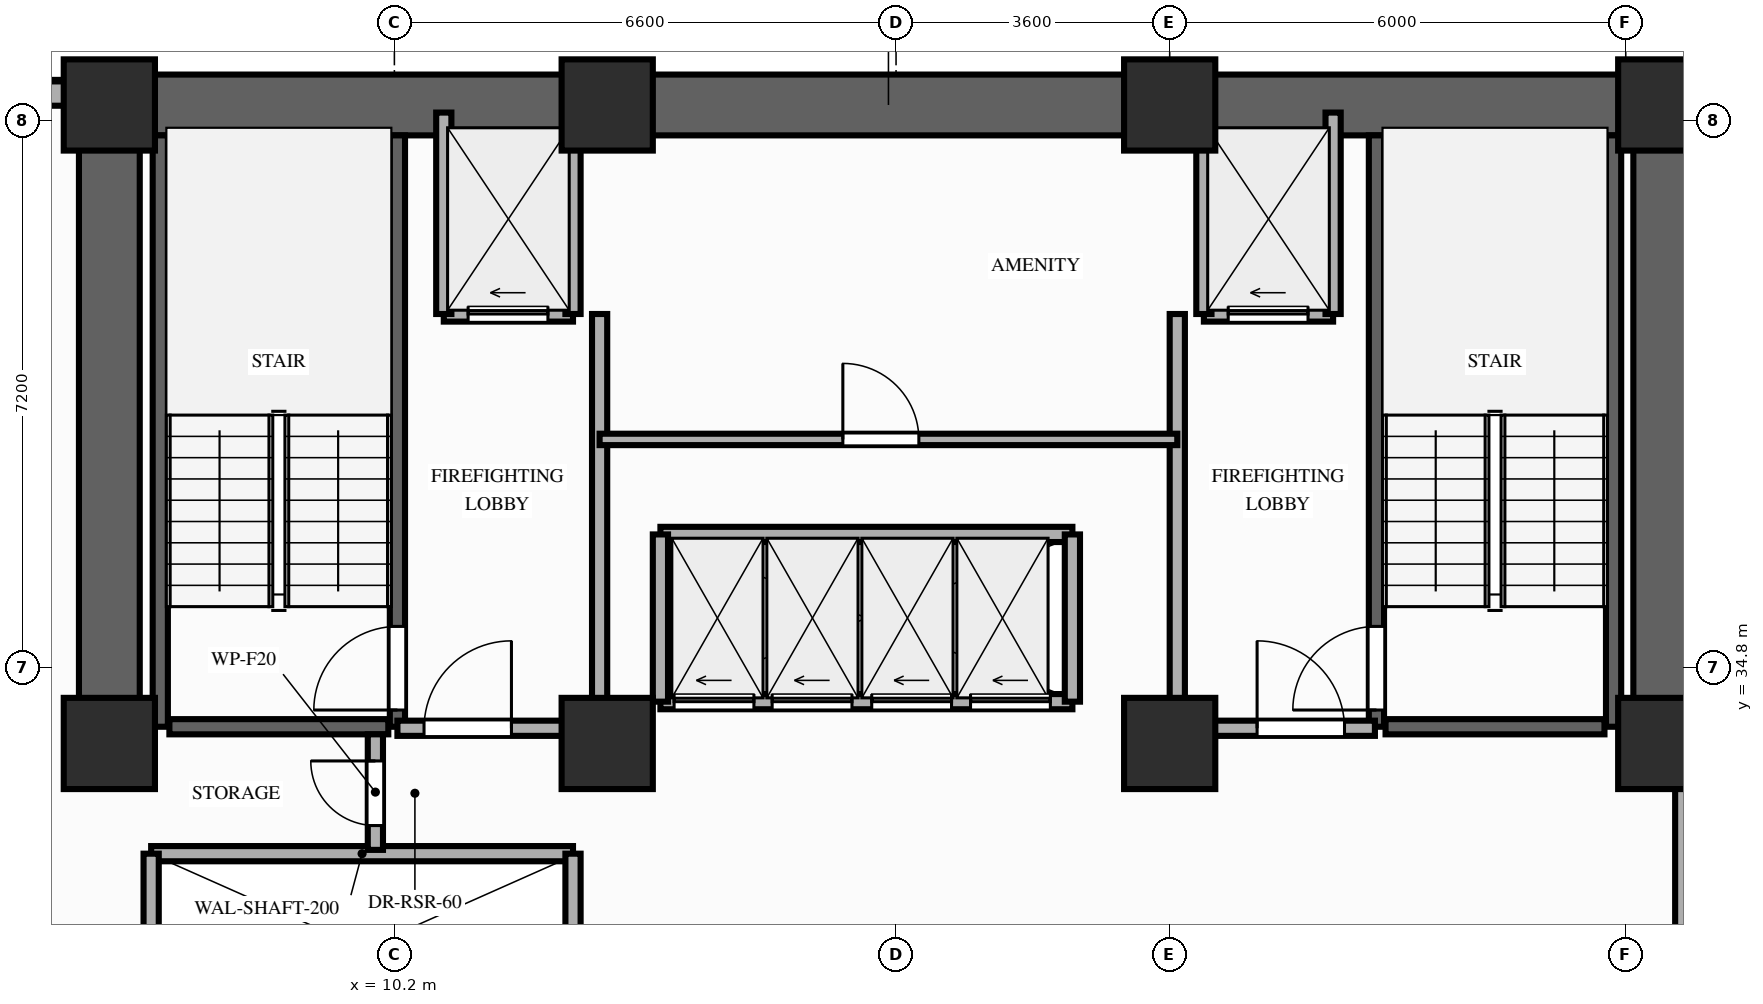
"""IFC4 building model, lengths in metres.
Left out: names, types, materials, properties, quantities, classifications, styles, units other than length and angle.
Written with IfcOpenShell. Run it as: python <this file> out.ifc"""

import sys

from ifc_helpers import new_model, si_unit, direction, frame, frame_2d, origin, origin_2d, place, context, subcontext, project, spatial, rectangle, extrude, element, fill, save


model = new_model("IFC4")
c1 = context("Model", 3, precision=1e-05, world=origin(), true_north=direction((0.0, 1.0)))
c2 = subcontext(c1, "Body", "Model", "MODEL_VIEW")
j1 = project(units=[si_unit("LENGTHUNIT", "METRE"), si_unit("PLANEANGLEUNIT", "RADIAN")], contexts=[c1])
p1 = place(None, origin())
s1 = spatial("IfcSite", under=j1, at=p1, CompositionType="ELEMENT")
p2 = place(p1, origin())
s2 = spatial("IfcBuilding", under=s1, at=p2, CompositionType="ELEMENT")
p3 = place(p2, frame((0.0, 0.0, 96.2)))
s3 = spatial("IfcBuildingStorey", under=s2, at=p3, CompositionType="ELEMENT", Elevation=96.2)
for number, where, z_axis, x_axis in (
    (1, (6.45, 33.8, 0.0), (0.0, 0.0, 1.0), (1.0, 0.0, 0.0)),
    (2, (13.0, 33.8, 0.0), (0.0, 0.0, 1.0), (1.0, 0.0, 0.0)),
    (3, (20.4, 33.8, 0.0), (0.0, 0.0, 1.0), (1.0, 0.0, 0.0)),
    (4, (26.9, 33.8, 0.0), (0.0, 0.0, 1.0), (1.0, 0.0, 0.0)),
    (5, (6.45, 42.2, 0.0), (0.0, 0.0, 1.0), (1.0, 0.0, 0.0)),
    (6, (13.0, 42.2, 0.0), (0.0, 0.0, 1.0), (1.0, 0.0, 0.0)),
    (7, (20.4, 42.2, 0.0), (0.0, 0.0, 1.0), (1.0, 0.0, 0.0)),
    (8, (26.9, 42.2, 0.0), (0.0, 0.0, 1.0), (1.0, 0.0, 0.0)),
):
    element("IfcColumn", number, at=place(p3, frame(where, z_axis=z_axis, x_axis=x_axis)), inside=s3, PredefinedType="COLUMN", context=c2, shape_type="SweptSolid", body=[
        extrude(rectangle(XDim=1.2, YDim=1.2, at=origin_2d()), origin(), (0.0, 0.0, 1.0), 3.2),
    ])
p4 = place(p3, frame((6.0, 42.35, 0.0), z_axis=(0.0, 0.0, 1.0), x_axis=(-1.0, 0.0, 0.0)))
e9 = element("IfcWall", 9, at=p4, inside=s3, PredefinedType="STANDARD", context=c2, shape_type="SweptSolid", body=[
    extrude(rectangle(XDim=2.0, YDim=0.32, at=frame_2d((1.0, 0.0))), origin(), (0.0, 0.0, 1.0), 3.02),
])
p5 = place(p3, frame((6.45, 42.2, 0.0), z_axis=(0.0, 0.0, 1.0), x_axis=(1.0, 0.0, 0.0)))
e10 = element("IfcWall", 10, at=p5, inside=s3, PredefinedType="SHEAR", context=c2, shape_type="SweptSolid", body=[
    extrude(rectangle(XDim=20.45, YDim=0.8, at=frame_2d((10.225, 0.0))), origin(), (0.0, 0.0, 1.0), 3.02),
])
for number, where, z_axis, x_axis in (
    (11, (6.45, 33.8, 0.0), (0.0, 0.0, 1.0), (0.0, 1.0, 0.0)),
    (12, (26.9, 33.8, 0.0), (0.0, 0.0, 1.0), (0.0, 1.0, 0.0)),
):
    element("IfcWall", number, at=place(p3, frame(where, z_axis=z_axis, x_axis=x_axis)), inside=s3, PredefinedType="SHEAR", context=c2, shape_type="SweptSolid", body=[
        extrude(rectangle(XDim=7.95, YDim=0.8, at=frame_2d((3.975, 0.0))), origin(), (0.0, 0.0, 1.0), 3.02),
    ])
p6 = place(p3, frame((7.12, 34.02, 0.0), z_axis=(0.0, 0.0, 1.0), x_axis=(0.0, 1.0, 0.0)))
e13 = element("IfcWall", 13, at=p6, inside=s3, PredefinedType="SHEAR", context=c2, shape_type="SweptSolid", body=[
    extrude(rectangle(XDim=7.78, YDim=0.2, at=frame_2d((3.89, 0.0))), origin(), (0.0, 0.0, 1.0), 3.02),
])
p7 = place(p3, frame((10.24, 34.02, 0.0), z_axis=(0.0, 0.0, 1.0), x_axis=(0.0, 1.0, 0.0)))
e14 = element("IfcWall", 14, at=p7, inside=s3, PredefinedType="SHEAR", context=c2, shape_type="SweptSolid", body=[
    extrude(rectangle(XDim=7.78, YDim=0.2, at=frame_2d((3.89, 0.0))), origin(), (0.0, 0.0, 1.0), 3.02),
])
p8 = place(p7, frame((0.22, 0.0, 0.0)))
e15 = element("IfcOpeningElement", 15, at=p8, cuts=e14, PredefinedType="OPENING", context=c2, shape_type="SweptSolid", body=[
    extrude(rectangle(XDim=1.1, YDim=2.15, at=frame_2d((0.55, 1.075))), frame((0.0, 0.11, 0.0), z_axis=(0.0, -1.0, 0.0), x_axis=(1.0, 0.0, 0.0)), (0.0, 0.0, 1.0), 0.22),
])
p9 = place(p3, frame((7.24, 34.02, 0.0), z_axis=(0.0, 0.0, 1.0), x_axis=(1.0, 0.0, 0.0)))
e16 = element("IfcWall", 16, at=p9, inside=s3, PredefinedType="SHEAR", context=c2, shape_type="SweptSolid", body=[
    extrude(rectangle(XDim=2.88, YDim=0.2, at=frame_2d((1.44, 0.0))), origin(), (0.0, 0.0, 1.0), 3.02),
])
p10 = place(p3, frame((23.12, 34.02, 0.0), z_axis=(0.0, 0.0, 1.0), x_axis=(0.0, 1.0, 0.0)))
e17 = element("IfcWall", 17, at=p10, inside=s3, PredefinedType="SHEAR", context=c2, shape_type="SweptSolid", body=[
    extrude(rectangle(XDim=7.78, YDim=0.2, at=frame_2d((3.89, 0.0))), origin(), (0.0, 0.0, 1.0), 3.02),
])
p11 = place(p10, frame((0.22, 0.0, 0.0)))
e18 = element("IfcOpeningElement", 18, at=p11, cuts=e17, PredefinedType="OPENING", context=c2, shape_type="SweptSolid", body=[
    extrude(rectangle(XDim=1.1, YDim=2.15, at=frame_2d((0.55, 1.075))), frame((0.0, 0.11, 0.0), z_axis=(0.0, -1.0, 0.0), x_axis=(1.0, 0.0, 0.0)), (0.0, 0.0, 1.0), 0.22),
])
p12 = place(p3, frame((26.24, 34.02, 0.0), z_axis=(0.0, 0.0, 1.0), x_axis=(0.0, 1.0, 0.0)))
e19 = element("IfcWall", 19, at=p12, inside=s3, PredefinedType="SHEAR", context=c2, shape_type="SweptSolid", body=[
    extrude(rectangle(XDim=7.78, YDim=0.2, at=frame_2d((3.89, 0.0))), origin(), (0.0, 0.0, 1.0), 3.02),
])
p13 = place(p3, frame((23.24, 34.02, 0.0), z_axis=(0.0, 0.0, 1.0), x_axis=(1.0, 0.0, 0.0)))
e20 = element("IfcWall", 20, at=p13, inside=s3, PredefinedType="SHEAR", context=c2, shape_type="SweptSolid", body=[
    extrude(rectangle(XDim=2.88, YDim=0.2, at=frame_2d((1.44, 0.0))), origin(), (0.0, 0.0, 1.0), 3.02),
])
p14 = place(p3, frame((7.0, 32.35, 0.0), z_axis=(0.0, 0.0, 1.0), x_axis=(1.0, 0.0, 0.0)))
e21 = element("IfcWall", 21, at=p14, inside=s3, PredefinedType="MOVABLE", context=c2, shape_type="SweptSolid", body=[
    extrude(rectangle(XDim=5.55, YDim=0.2, at=frame_2d((2.775, 0.0))), origin(), (0.0, 0.0, 1.0), 3.02),
])
for number, where, z_axis, x_axis in (
    (22, (7.0, 29.85, 0.0), (0.0, 0.0, 1.0), (0.0, 1.0, 0.0)),
    (23, (12.55, 29.85, 0.0), (0.0, 0.0, 1.0), (0.0, 1.0, 0.0)),
):
    element("IfcWall", number, at=place(p3, frame(where, z_axis=z_axis, x_axis=x_axis)), inside=s3, PredefinedType="MOVABLE", context=c2, shape_type="SweptSolid", body=[
        extrude(rectangle(XDim=2.5, YDim=0.2, at=frame_2d((1.25, 0.0))), origin(), (0.0, 0.0, 1.0), 3.02),
    ])
p15 = place(p3, frame((10.85, 39.45, 0.0), z_axis=(0.0, 0.0, 1.0), x_axis=(1.0, 0.0, 0.0)))
e24 = element("IfcWall", 24, at=p15, inside=s3, PredefinedType="MOVABLE", context=c2, shape_type="SweptSolid", body=[
    extrude(rectangle(XDim=1.7, YDim=0.2, at=frame_2d((0.85, 0.0))), origin(), (0.0, 0.0, 1.0), 3.02),
])
p16 = place(p15, frame((0.32, 0.0, 0.0)))
e25 = element("IfcOpeningElement", 25, at=p16, cuts=e24, PredefinedType="OPENING", context=c2, shape_type="SweptSolid", body=[
    extrude(rectangle(XDim=1.05, YDim=2.15, at=frame_2d((0.525, 1.075))), frame((0.0, 0.11, 0.0), z_axis=(0.0, -1.0, 0.0), x_axis=(1.0, 0.0, 0.0)), (0.0, 0.0, 1.0), 0.22),
])
p17 = place(p3, frame((20.85, 39.45, 0.0), z_axis=(0.0, 0.0, 1.0), x_axis=(1.0, 0.0, 0.0)))
e26 = element("IfcWall", 26, at=p17, inside=s3, PredefinedType="MOVABLE", context=c2, shape_type="SweptSolid", body=[
    extrude(rectangle(XDim=1.7, YDim=0.2, at=frame_2d((0.85, 0.0))), origin(), (0.0, 0.0, 1.0), 3.02),
])
p18 = place(p17, frame((0.32, 0.0, 0.0)))
e27 = element("IfcOpeningElement", 27, at=p18, cuts=e26, PredefinedType="OPENING", context=c2, shape_type="SweptSolid", body=[
    extrude(rectangle(XDim=1.05, YDim=2.15, at=frame_2d((0.525, 1.075))), frame((0.0, 0.11, 0.0), z_axis=(0.0, -1.0, 0.0), x_axis=(1.0, 0.0, 0.0)), (0.0, 0.0, 1.0), 0.22),
])
for number, where, z_axis, x_axis in (
    (28, (10.85, 39.45, 0.0), (0.0, 0.0, 1.0), (0.0, 1.0, 0.0)),
    (29, (12.55, 39.45, 0.0), (0.0, 0.0, 1.0), (0.0, 1.0, 0.0)),
):
    element("IfcWall", number, at=place(p3, frame(where, z_axis=z_axis, x_axis=x_axis)), inside=s3, PredefinedType="MOVABLE", context=c2, shape_type="SweptSolid", body=[
        extrude(rectangle(XDim=2.65, YDim=0.2, at=frame_2d((1.325, 0.0))), origin(), (0.0, 0.0, 1.0), 2.41),
    ])
p19 = place(p3, frame((12.9, 34.0, 0.0), z_axis=(0.0, 0.0, 1.0), x_axis=(0.0, 1.0, 0.0)))
e30 = element("IfcWall", 30, at=p19, inside=s3, PredefinedType="PARTITIONING", context=c2, shape_type="SweptSolid", body=[
    extrude(rectangle(XDim=5.45, YDim=0.2, at=frame_2d((2.725, 0.0))), origin(), (0.0, 0.0, 1.0), 2.41),
])
p20 = place(p3, frame((10.24, 34.0, 0.0), z_axis=(0.0, 0.0, 1.0), x_axis=(1.0, 0.0, 0.0)))
e31 = element("IfcWall", 31, at=p20, inside=s3, PredefinedType="PARTITIONING", context=c2, shape_type="SweptSolid", body=[
    extrude(rectangle(XDim=2.66, YDim=0.2, at=frame_2d((1.33, 0.0))), origin(), (0.0, 0.0, 1.0), 2.41),
])
p21 = place(p20, frame((0.35, 0.0, 0.0)))
e32 = element("IfcOpeningElement", 32, at=p21, cuts=e31, PredefinedType="OPENING", context=c2, shape_type="SweptSolid", body=[
    extrude(rectangle(XDim=1.15, YDim=2.15, at=frame_2d((0.575, 1.075))), frame((0.0, 0.11, 0.0), z_axis=(0.0, -1.0, 0.0), x_axis=(1.0, 0.0, 0.0)), (0.0, 0.0, 1.0), 0.22),
])
for number, where, z_axis, x_axis in (
    (33, (20.85, 39.45, 0.0), (0.0, 0.0, 1.0), (0.0, 1.0, 0.0)),
    (34, (22.55, 39.45, 0.0), (0.0, 0.0, 1.0), (0.0, 1.0, 0.0)),
):
    element("IfcWall", number, at=place(p3, frame(where, z_axis=z_axis, x_axis=x_axis)), inside=s3, PredefinedType="MOVABLE", context=c2, shape_type="SweptSolid", body=[
        extrude(rectangle(XDim=2.65, YDim=0.2, at=frame_2d((1.325, 0.0))), origin(), (0.0, 0.0, 1.0), 2.41),
    ])
p22 = place(p3, frame((20.5, 34.0, 0.0), z_axis=(0.0, 0.0, 1.0), x_axis=(0.0, 1.0, 0.0)))
e35 = element("IfcWall", 35, at=p22, inside=s3, PredefinedType="PARTITIONING", context=c2, shape_type="SweptSolid", body=[
    extrude(rectangle(XDim=5.45, YDim=0.2, at=frame_2d((2.725, 0.0))), origin(), (0.0, 0.0, 1.0), 2.41),
])
p23 = place(p3, frame((20.5, 34.0, 0.0), z_axis=(0.0, 0.0, 1.0), x_axis=(1.0, 0.0, 0.0)))
e36 = element("IfcWall", 36, at=p23, inside=s3, PredefinedType="PARTITIONING", context=c2, shape_type="SweptSolid", body=[
    extrude(rectangle(XDim=2.6, YDim=0.2, at=frame_2d((1.3, 0.0))), origin(), (0.0, 0.0, 1.0), 2.41),
])
p24 = place(p23, frame((1.05, 0.0, 0.0)))
e37 = element("IfcOpeningElement", 37, at=p24, cuts=e36, PredefinedType="OPENING", context=c2, shape_type="SweptSolid", body=[
    extrude(rectangle(XDim=1.15, YDim=2.15, at=frame_2d((0.575, 1.075))), frame((0.0, 0.11, 0.0), z_axis=(0.0, -1.0, 0.0), x_axis=(1.0, 0.0, 0.0)), (0.0, 0.0, 1.0), 0.22),
])
p25 = place(p3, frame((9.95, 32.4, 0.0), z_axis=(0.0, 0.0, 1.0), x_axis=(0.0, 1.0, 0.0)))
e38 = element("IfcWall", 38, at=p25, inside=s3, PredefinedType="PARTITIONING", context=c2, shape_type="SweptSolid", body=[
    extrude(rectangle(XDim=1.52, YDim=0.2, at=frame_2d((0.76, 0.0))), origin(), (0.0, 0.0, 1.0), 2.41),
])
p26 = place(p25, frame((0.32, 0.0, 0.0)))
e39 = element("IfcOpeningElement", 39, at=p26, cuts=e38, PredefinedType="OPENING", context=c2, shape_type="SweptSolid", body=[
    extrude(rectangle(XDim=0.85, YDim=2.05, at=frame_2d((0.425, 1.025))), frame((0.0, 0.11, 0.0), z_axis=(0.0, -1.0, 0.0), x_axis=(1.0, 0.0, 0.0)), (0.0, 0.0, 1.0), 0.22),
])
p27 = place(p3, frame((12.9, 37.8, 0.0), z_axis=(0.0, 0.0, 1.0), x_axis=(1.0, 0.0, 0.0)))
e40 = element("IfcWall", 40, at=p27, inside=s3, PredefinedType="PARTITIONING", context=c2, shape_type="SweptSolid", body=[
    extrude(rectangle(XDim=7.6, YDim=0.15, at=frame_2d((3.8, 0.0))), origin(), (0.0, 0.0, 1.0), 3.02),
])
p28 = place(p27, frame((3.2, 0.0, 0.0)))
e41 = element("IfcOpeningElement", 41, at=p28, cuts=e40, PredefinedType="OPENING", context=c2, shape_type="SweptSolid", body=[
    extrude(rectangle(XDim=1.0, YDim=2.15, at=frame_2d((0.5, 1.075))), frame((0.0, 0.085, 0.0), z_axis=(0.0, -1.0, 0.0), x_axis=(1.0, 0.0, 0.0)), (0.0, 0.0, 1.0), 0.17),
])
p29 = place(p3, frame((13.7, 34.35, 0.0), z_axis=(0.0, 0.0, 1.0), x_axis=(1.0, 0.0, 0.0)))
e42 = element("IfcWall", 42, at=p29, inside=s3, PredefinedType="MOVABLE", context=c2, shape_type="SweptSolid", body=[
    extrude(rectangle(XDim=5.42, YDim=0.2, at=frame_2d((2.71, 0.0))), origin(), (0.0, 0.0, 1.0), 3.02),
])
p30 = place(p29, frame((0.18, 0.0, 0.0)))
e43 = element("IfcOpeningElement", 43, at=p30, cuts=e42, PredefinedType="OPENING", context=c2, shape_type="SweptSolid", body=[
    extrude(rectangle(XDim=1.05, YDim=2.15, at=frame_2d((0.525, 1.075))), frame((0.0, 0.11, 0.0), z_axis=(0.0, -1.0, 0.0), x_axis=(1.0, 0.0, 0.0)), (0.0, 0.0, 1.0), 0.22),
])
p31 = place(p29, frame((1.47, 0.0, 0.0)))
e44 = element("IfcOpeningElement", 44, at=p31, cuts=e42, PredefinedType="OPENING", context=c2, shape_type="SweptSolid", body=[
    extrude(rectangle(XDim=1.05, YDim=2.15, at=frame_2d((0.525, 1.075))), frame((0.0, 0.11, 0.0), z_axis=(0.0, -1.0, 0.0), x_axis=(1.0, 0.0, 0.0)), (0.0, 0.0, 1.0), 0.22),
])
p32 = place(p29, frame((2.78, 0.0, 0.0)))
e45 = element("IfcOpeningElement", 45, at=p32, cuts=e42, PredefinedType="OPENING", context=c2, shape_type="SweptSolid", body=[
    extrude(rectangle(XDim=1.05, YDim=2.15, at=frame_2d((0.525, 1.075))), frame((0.0, 0.11, 0.0), z_axis=(0.0, -1.0, 0.0), x_axis=(1.0, 0.0, 0.0)), (0.0, 0.0, 1.0), 0.22),
])
p33 = place(p29, frame((4.08, 0.0, 0.0)))
e46 = element("IfcOpeningElement", 46, at=p33, cuts=e42, PredefinedType="OPENING", context=c2, shape_type="SweptSolid", body=[
    extrude(rectangle(XDim=1.05, YDim=2.15, at=frame_2d((0.525, 1.075))), frame((0.0, 0.11, 0.0), z_axis=(0.0, -1.0, 0.0), x_axis=(1.0, 0.0, 0.0)), (0.0, 0.0, 1.0), 0.22),
])
p34 = place(p3, frame((13.7, 36.55, 0.0), z_axis=(0.0, 0.0, 1.0), x_axis=(1.0, 0.0, 0.0)))
e47 = element("IfcWall", 47, at=p34, inside=s3, PredefinedType="MOVABLE", context=c2, shape_type="SweptSolid", body=[
    extrude(rectangle(XDim=5.42, YDim=0.2, at=frame_2d((2.71, 0.0))), origin(), (0.0, 0.0, 1.0), 3.02),
])
for number, where, z_axis, x_axis in (
    (48, (13.7, 34.35, 0.0), (0.0, 0.0, 1.0), (0.0, 1.0, 0.0)),
    (49, (19.12, 34.35, 0.0), (0.0, 0.0, 1.0), (0.0, 1.0, 0.0)),
):
    element("IfcWall", number, at=place(p3, frame(where, z_axis=z_axis, x_axis=x_axis)), inside=s3, PredefinedType="MOVABLE", context=c2, shape_type="SweptSolid", body=[
        extrude(rectangle(XDim=2.2, YDim=0.2, at=frame_2d((1.1, 0.0))), origin(), (0.0, 0.0, 1.0), 3.02),
    ])
p35 = place(p3, frame((27.15, 31.2, 0.0), z_axis=(0.0, 0.0, 1.0), x_axis=(0.0, 1.0, 0.0)))
e50 = element("IfcWall", 50, at=p35, inside=s3, PredefinedType="PARTITIONING", context=c2, shape_type="SweptSolid", body=[
    extrude(rectangle(XDim=2.48, YDim=0.2, at=frame_2d((1.24, 0.0))), origin(), (0.0, 0.0, 1.0), 2.41),
])
p36 = place(p8, origin())
e51 = element("IfcDoor", 51, at=p36, inside=s3, OperationType="SINGLE_SWING_LEFT", PredefinedType="DOOR", context=c2, shape_type="SweptSolid", body=[
    extrude(rectangle(XDim=1.1, YDim=2.15, at=frame_2d((0.55, 1.075))), frame((0.0, 0.025, 0.0), z_axis=(0.0, -1.0, 0.0), x_axis=(1.0, 0.0, 0.0)), (0.0, 0.0, 1.0), 0.05),
])
fill(e15, e51)
p37 = place(p11, origin())
e52 = element("IfcDoor", 52, at=p37, inside=s3, OperationType="SINGLE_SWING_LEFT", PredefinedType="DOOR", context=c2, shape_type="SweptSolid", body=[
    extrude(rectangle(XDim=1.1, YDim=2.15, at=frame_2d((0.55, 1.075))), frame((0.0, 0.025, 0.0), z_axis=(0.0, -1.0, 0.0), x_axis=(1.0, 0.0, 0.0)), (0.0, 0.0, 1.0), 0.05),
])
fill(e18, e52)
p38 = place(p16, origin())
e53 = element("IfcDoor", 53, at=p38, inside=s3, OperationType="SLIDING_TO_LEFT", PredefinedType="DOOR", context=c2, shape_type="SweptSolid", body=[
    extrude(rectangle(XDim=1.05, YDim=2.15, at=frame_2d((0.525, 1.075))), frame((0.0, 0.025, 0.0), z_axis=(0.0, -1.0, 0.0), x_axis=(1.0, 0.0, 0.0)), (0.0, 0.0, 1.0), 0.05),
])
fill(e25, e53)
p39 = place(p18, origin())
e54 = element("IfcDoor", 54, at=p39, inside=s3, OperationType="SLIDING_TO_LEFT", PredefinedType="DOOR", context=c2, shape_type="SweptSolid", body=[
    extrude(rectangle(XDim=1.05, YDim=2.15, at=frame_2d((0.525, 1.075))), frame((0.0, 0.025, 0.0), z_axis=(0.0, -1.0, 0.0), x_axis=(1.0, 0.0, 0.0)), (0.0, 0.0, 1.0), 0.05),
])
fill(e27, e54)
p40 = place(p21, origin())
e55 = element("IfcDoor", 55, at=p40, inside=s3, OperationType="SINGLE_SWING_RIGHT", PredefinedType="DOOR", context=c2, shape_type="SweptSolid", body=[
    extrude(rectangle(XDim=1.15, YDim=2.15, at=frame_2d((0.575, 1.075))), frame((0.0, 0.025, 0.0), z_axis=(0.0, -1.0, 0.0), x_axis=(1.0, 0.0, 0.0)), (0.0, 0.0, 1.0), 0.05),
])
fill(e32, e55)
p41 = place(p24, origin())
e56 = element("IfcDoor", 56, at=p41, inside=s3, OperationType="SINGLE_SWING_LEFT", PredefinedType="DOOR", context=c2, shape_type="SweptSolid", body=[
    extrude(rectangle(XDim=1.15, YDim=2.15, at=frame_2d((0.575, 1.075))), frame((0.0, 0.025, 0.0), z_axis=(0.0, -1.0, 0.0), x_axis=(1.0, 0.0, 0.0)), (0.0, 0.0, 1.0), 0.05),
])
fill(e37, e56)
p42 = place(p26, origin())
e57 = element("IfcDoor", 57, at=p42, inside=s3, OperationType="SINGLE_SWING_RIGHT", PredefinedType="DOOR", context=c2, shape_type="SweptSolid", body=[
    extrude(rectangle(XDim=0.85, YDim=2.05, at=frame_2d((0.425, 1.025))), frame((0.0, 0.025, 0.0), z_axis=(0.0, -1.0, 0.0), x_axis=(1.0, 0.0, 0.0)), (0.0, 0.0, 1.0), 0.05),
])
fill(e39, e57)
p43 = place(p28, origin())
e58 = element("IfcDoor", 58, at=p43, inside=s3, OperationType="SINGLE_SWING_LEFT", PredefinedType="DOOR", context=c2, shape_type="SweptSolid", body=[
    extrude(rectangle(XDim=1.0, YDim=2.15, at=frame_2d((0.5, 1.075))), frame((0.0, 0.025, 0.0), z_axis=(0.0, -1.0, 0.0), x_axis=(1.0, 0.0, 0.0)), (0.0, 0.0, 1.0), 0.05),
])
fill(e41, e58)
p44 = place(p30, origin())
e59 = element("IfcDoor", 59, at=p44, inside=s3, OperationType="SLIDING_TO_LEFT", PredefinedType="DOOR", context=c2, shape_type="SweptSolid", body=[
    extrude(rectangle(XDim=1.05, YDim=2.15, at=frame_2d((0.525, 1.075))), frame((0.0, 0.025, 0.0), z_axis=(0.0, -1.0, 0.0), x_axis=(1.0, 0.0, 0.0)), (0.0, 0.0, 1.0), 0.05),
])
fill(e43, e59)
p45 = place(p31, origin())
e60 = element("IfcDoor", 60, at=p45, inside=s3, OperationType="SLIDING_TO_LEFT", PredefinedType="DOOR", context=c2, shape_type="SweptSolid", body=[
    extrude(rectangle(XDim=1.05, YDim=2.15, at=frame_2d((0.525, 1.075))), frame((0.0, 0.025, 0.0), z_axis=(0.0, -1.0, 0.0), x_axis=(1.0, 0.0, 0.0)), (0.0, 0.0, 1.0), 0.05),
])
fill(e44, e60)
p46 = place(p32, origin())
e61 = element("IfcDoor", 61, at=p46, inside=s3, OperationType="SLIDING_TO_LEFT", PredefinedType="DOOR", context=c2, shape_type="SweptSolid", body=[
    extrude(rectangle(XDim=1.05, YDim=2.15, at=frame_2d((0.525, 1.075))), frame((0.0, 0.025, 0.0), z_axis=(0.0, -1.0, 0.0), x_axis=(1.0, 0.0, 0.0)), (0.0, 0.0, 1.0), 0.05),
])
fill(e45, e61)
p47 = place(p33, origin())
e62 = element("IfcDoor", 62, at=p47, inside=s3, OperationType="SLIDING_TO_LEFT", PredefinedType="DOOR", context=c2, shape_type="SweptSolid", body=[
    extrude(rectangle(XDim=1.05, YDim=2.15, at=frame_2d((0.525, 1.075))), frame((0.0, 0.025, 0.0), z_axis=(0.0, -1.0, 0.0), x_axis=(1.0, 0.0, 0.0)), (0.0, 0.0, 1.0), 0.05),
])
fill(e46, e62)
save(model, sys.argv[1])
